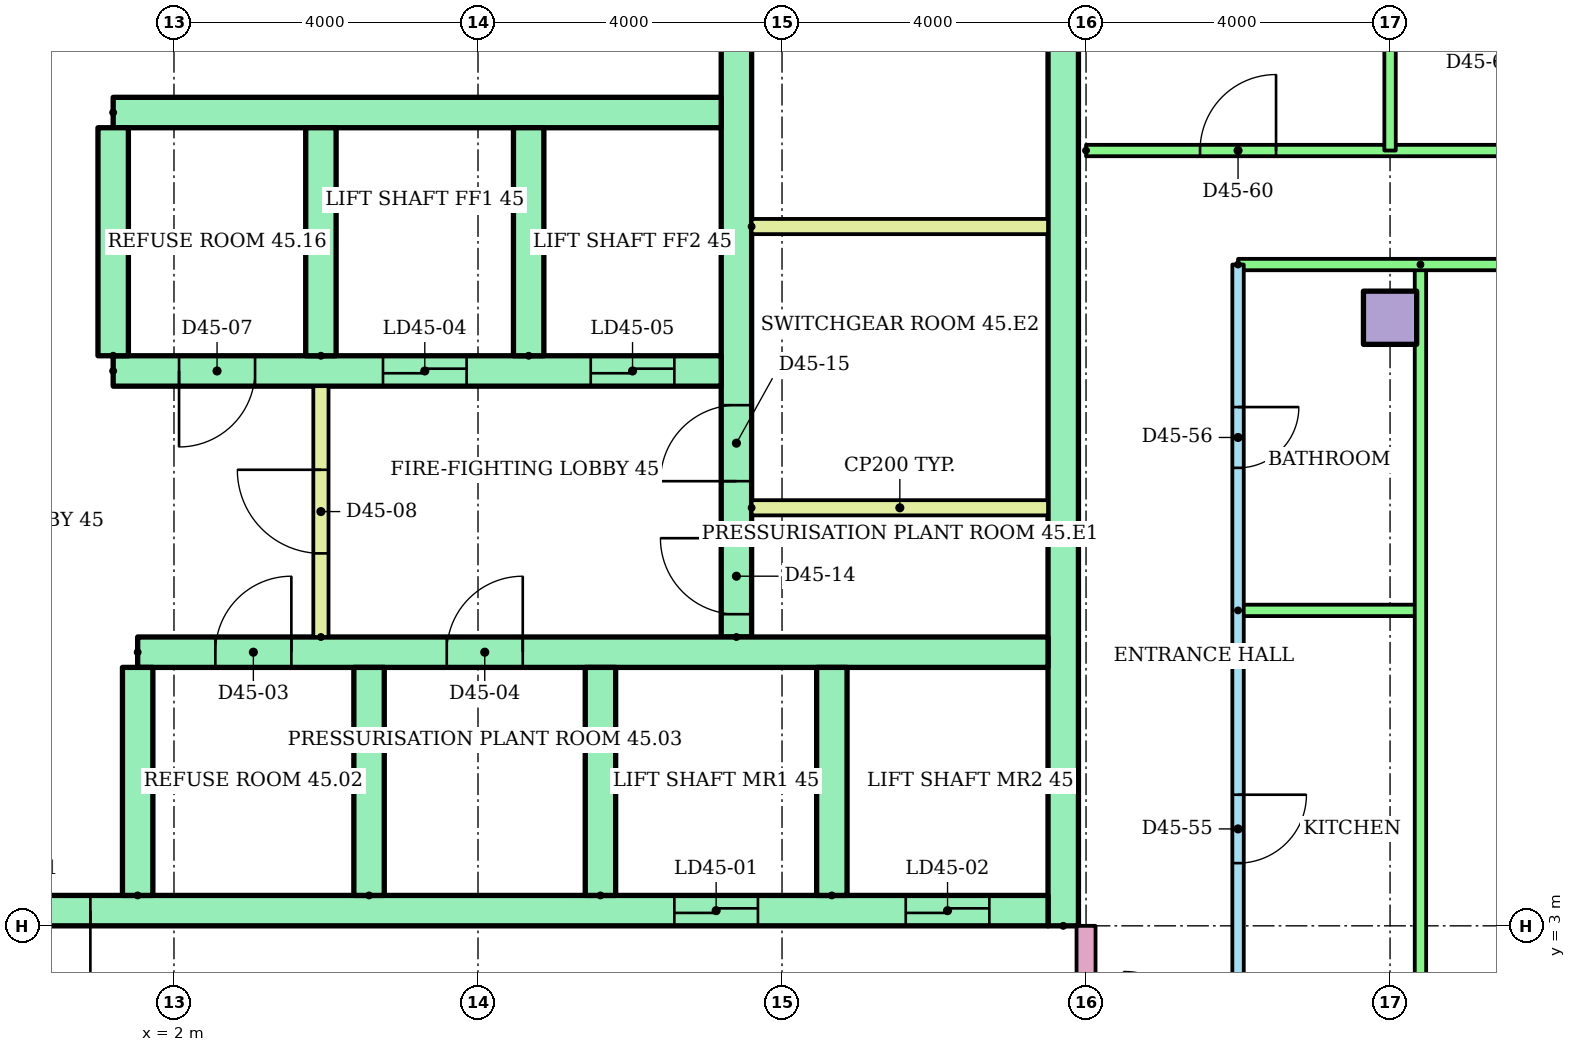
"""IFC4 building model, lengths in metres.
Left out: names, types, materials, properties, quantities, classifications, styles, units other than length and angle.
Written with IfcOpenShell. Run it as: python <this file> out.ifc"""

import sys

from ifc_helpers import new_model, si_unit, direction, frame, frame_2d, origin, origin_2d, place, context, subcontext, project, spatial, rectangle, extrude, element, fill, save


model = new_model("IFC4")
c1 = context("Model", 3, precision=1e-05, world=origin(), true_north=direction((0.0, 1.0)))
c2 = subcontext(c1, "Body", "Model", "MODEL_VIEW")
j1 = project(units=[si_unit("LENGTHUNIT", "METRE"), si_unit("PLANEANGLEUNIT", "RADIAN")], contexts=[c1])
p1 = place(None, origin())
s1 = spatial("IfcSite", under=j1, at=p1, CompositionType="ELEMENT")
p2 = place(p1, origin())
s2 = spatial("IfcBuilding", under=s1, at=p2, CompositionType="ELEMENT")
p3 = place(p2, frame((0.0, 0.0, 174.9)))
s3 = spatial("IfcBuildingStorey", under=s2, at=p3, CompositionType="ELEMENT", Elevation=174.9)
p4 = place(p3, frame((18.0, 11.0, 0.0)))
e1 = element("IfcColumn", 1, at=p4, inside=s3, PredefinedType="COLUMN", context=c2, shape_type="SweptSolid", body=[
    extrude(rectangle(XDim=0.7, YDim=0.7, at=origin_2d()), origin(), (0.0, 0.0, 1.0), 3.2),
])
p5 = place(p3, frame((13.7, 3.0, 0.0), z_axis=(0.0, 0.0, 1.0), x_axis=(0.0, 1.0, 0.0)))
e2 = element("IfcWall", 2, at=p5, inside=s3, PredefinedType="SHEAR", context=c2, shape_type="SweptSolid", body=[
    extrude(rectangle(XDim=17.0, YDim=0.4, at=frame_2d((8.5, 0.0))), origin(), (0.0, 0.0, 1.0), 2.92),
])
p6 = place(p3, frame((9.4, 6.8, 0.0), z_axis=(0.0, 0.0, 1.0), x_axis=(0.0, 1.0, 0.0)))
e3 = element("IfcWall", 3, at=p6, inside=s3, PredefinedType="SHEAR", context=c2, shape_type="SweptSolid", body=[
    extrude(rectangle(XDim=12.7, YDim=0.4, at=frame_2d((6.35, 0.0))), origin(), (0.0, 0.0, 1.0), 2.92),
])
p7 = place(p6, frame((0.3, 0.0, 0.0)))
e4 = element("IfcOpeningElement", 4, at=p7, cuts=e3, PredefinedType="OPENING", context=c2, shape_type="SweptSolid", body=[
    extrude(rectangle(XDim=1.0, YDim=2.1, at=frame_2d((0.5, 1.05))), frame((0.0, 0.21, 0.0), z_axis=(0.0, -1.0, 0.0), x_axis=(1.0, 0.0, 0.0)), (0.0, 0.0, 1.0), 0.42),
])
p8 = place(p6, frame((2.05, 0.0, 0.0)))
e5 = element("IfcOpeningElement", 5, at=p8, cuts=e3, PredefinedType="OPENING", context=c2, shape_type="SweptSolid", body=[
    extrude(rectangle(XDim=1.0, YDim=2.1, at=frame_2d((0.5, 1.05))), frame((0.0, 0.21, 0.0), z_axis=(0.0, -1.0, 0.0), x_axis=(1.0, 0.0, 0.0)), (0.0, 0.0, 1.0), 0.42),
])
p9 = place(p6, frame((7.925, 0.0, 0.0)))
e6 = element("IfcOpeningElement", 6, at=p9, cuts=e3, PredefinedType="OPENING", context=c2, shape_type="SweptSolid", body=[
    extrude(rectangle(XDim=1.0, YDim=2.1, at=frame_2d((0.5, 1.05))), frame((0.0, 0.21, 0.0), z_axis=(0.0, -1.0, 0.0), x_axis=(1.0, 0.0, 0.0)), (0.0, 0.0, 1.0), 0.42),
])
p10 = place(p3, frame((-13.5, 3.2, 0.0)))
e7 = element("IfcWall", 7, at=p10, inside=s3, PredefinedType="SHEAR", context=c2, shape_type="SweptSolid", body=[
    extrude(rectangle(XDim=27.0, YDim=0.4, at=frame_2d((13.5, 0.0))), origin(), (0.0, 0.0, 1.0), 2.92),
])
p11 = place(p10, frame((22.083, 0.0, 0.0)))
e8 = element("IfcOpeningElement", 8, at=p11, cuts=e7, PredefinedType="OPENING", context=c2, shape_type="SweptSolid", body=[
    extrude(rectangle(XDim=1.1, YDim=2.1, at=frame_2d((0.55, 1.05))), frame((0.0, 0.21, 0.0), z_axis=(0.0, -1.0, 0.0), x_axis=(1.0, 0.0, 0.0)), (0.0, 0.0, 1.0), 0.42),
])
p12 = place(p10, frame((25.128, 0.0, 0.0)))
e9 = element("IfcOpeningElement", 9, at=p12, cuts=e7, PredefinedType="OPENING", context=c2, shape_type="SweptSolid", body=[
    extrude(rectangle(XDim=1.1, YDim=2.1, at=frame_2d((0.55, 1.05))), frame((0.0, 0.21, 0.0), z_axis=(0.0, -1.0, 0.0), x_axis=(1.0, 0.0, 0.0)), (0.0, 0.0, 1.0), 0.42),
])
p13 = place(p10, frame((12.6, 0.0, 0.0)))
e10 = element("IfcOpeningElement", 10, at=p13, cuts=e7, PredefinedType="OPENING", context=c2, shape_type="SweptSolid", body=[
    extrude(rectangle(XDim=1.8, YDim=2.1, at=frame_2d((0.9, 1.05))), frame((0.0, 0.21, 0.0), z_axis=(0.0, -1.0, 0.0), x_axis=(1.0, 0.0, 0.0)), (0.0, 0.0, 1.0), 0.42),
])
p14 = place(p3, frame((1.522, 6.6, 0.0)))
e11 = element("IfcWall", 11, at=p14, inside=s3, PredefinedType="SHEAR", context=c2, shape_type="SweptSolid", body=[
    extrude(rectangle(XDim=11.978, YDim=0.4, at=frame_2d((5.989, 0.0))), origin(), (0.0, 0.0, 1.0), 2.92),
])
p15 = place(p14, frame((1.022, 0.0, 0.0)))
e12 = element("IfcOpeningElement", 12, at=p15, cuts=e11, PredefinedType="OPENING", context=c2, shape_type="SweptSolid", body=[
    extrude(rectangle(XDim=1.0, YDim=2.1, at=frame_2d((0.5, 1.05))), frame((0.0, 0.21, 0.0), z_axis=(0.0, -1.0, 0.0), x_axis=(1.0, 0.0, 0.0)), (0.0, 0.0, 1.0), 0.42),
])
p16 = place(p14, frame((4.067, 0.0, 0.0)))
e13 = element("IfcOpeningElement", 13, at=p16, cuts=e11, PredefinedType="OPENING", context=c2, shape_type="SweptSolid", body=[
    extrude(rectangle(XDim=1.0, YDim=2.1, at=frame_2d((0.5, 1.05))), frame((0.0, 0.21, 0.0), z_axis=(0.0, -1.0, 0.0), x_axis=(1.0, 0.0, 0.0)), (0.0, 0.0, 1.0), 0.42),
])
for number, where, z_axis, x_axis in (
    (14, (1.522, 3.4, 0.0), (0.0, 0.0, 1.0), (0.0, 1.0, 0.0)),
    (15, (4.567, 3.4, 0.0), (0.0, 0.0, 1.0), (0.0, 1.0, 0.0)),
    (16, (7.611, 3.4, 0.0), (0.0, 0.0, 1.0), (0.0, 1.0, 0.0)),
    (17, (10.656, 3.4, 0.0), (0.0, 0.0, 1.0), (0.0, 1.0, 0.0)),
):
    element("IfcWall", number, at=place(p3, frame(where, z_axis=z_axis, x_axis=x_axis)), inside=s3, PredefinedType="SHEAR", context=c2, shape_type="SweptSolid", body=[
        extrude(rectangle(XDim=3.0, YDim=0.4, at=frame_2d((1.5, 0.0))), origin(), (0.0, 0.0, 1.0), 2.92),
    ])
p17 = place(p3, frame((1.2, 10.3, 0.0)))
e18 = element("IfcWall", 18, at=p17, inside=s3, PredefinedType="SHEAR", context=c2, shape_type="SweptSolid", body=[
    extrude(rectangle(XDim=8.0, YDim=0.4, at=frame_2d((4.0, 0.0))), origin(), (0.0, 0.0, 1.0), 2.92),
])
p18 = place(p17, frame((3.55, 0.0, 0.0)))
e19 = element("IfcOpeningElement", 19, at=p18, cuts=e18, PredefinedType="OPENING", context=c2, shape_type="SweptSolid", body=[
    extrude(rectangle(XDim=1.1, YDim=2.1, at=frame_2d((0.55, 1.05))), frame((0.0, 0.21, 0.0), z_axis=(0.0, -1.0, 0.0), x_axis=(1.0, 0.0, 0.0)), (0.0, 0.0, 1.0), 0.42),
])
p19 = place(p17, frame((6.283, 0.0, 0.0)))
e20 = element("IfcOpeningElement", 20, at=p19, cuts=e18, PredefinedType="OPENING", context=c2, shape_type="SweptSolid", body=[
    extrude(rectangle(XDim=1.1, YDim=2.1, at=frame_2d((0.55, 1.05))), frame((0.0, 0.21, 0.0), z_axis=(0.0, -1.0, 0.0), x_axis=(1.0, 0.0, 0.0)), (0.0, 0.0, 1.0), 0.42),
])
p20 = place(p17, frame((0.867, 0.0, 0.0)))
e21 = element("IfcOpeningElement", 21, at=p20, cuts=e18, PredefinedType="OPENING", context=c2, shape_type="SweptSolid", body=[
    extrude(rectangle(XDim=1.0, YDim=2.1, at=frame_2d((0.5, 1.05))), frame((0.0, 0.21, 0.0), z_axis=(0.0, -1.0, 0.0), x_axis=(1.0, 0.0, 0.0)), (0.0, 0.0, 1.0), 0.42),
])
p21 = place(p3, frame((1.2, 13.7, 0.0)))
e22 = element("IfcWall", 22, at=p21, inside=s3, PredefinedType="SHEAR", context=c2, shape_type="SweptSolid", body=[
    extrude(rectangle(XDim=8.0, YDim=0.4, at=frame_2d((4.0, 0.0))), origin(), (0.0, 0.0, 1.0), 2.92),
])
for number, where, z_axis, x_axis in (
    (23, (1.2, 10.5, 0.0), (0.0, 0.0, 1.0), (0.0, 1.0, 0.0)),
    (24, (3.933, 10.5, 0.0), (0.0, 0.0, 1.0), (0.0, 1.0, 0.0)),
    (25, (6.667, 10.5, 0.0), (0.0, 0.0, 1.0), (0.0, 1.0, 0.0)),
):
    element("IfcWall", number, at=place(p3, frame(where, z_axis=z_axis, x_axis=x_axis)), inside=s3, PredefinedType="SHEAR", context=c2, shape_type="SweptSolid", body=[
        extrude(rectangle(XDim=3.0, YDim=0.4, at=frame_2d((1.5, 0.0))), origin(), (0.0, 0.0, 1.0), 2.92),
    ])
p22 = place(p3, frame((3.933, 6.8, 0.0), z_axis=(0.0, 0.0, 1.0), x_axis=(0.0, 1.0, 0.0)))
e26 = element("IfcWall", 26, at=p22, inside=s3, PredefinedType="PARTITIONING", context=c2, shape_type="SweptSolid", body=[
    extrude(rectangle(XDim=3.3, YDim=0.2, at=frame_2d((1.65, 0.0))), origin(), (0.0, 0.0, 1.0), 2.92),
])
p23 = place(p22, frame((1.1, 0.0, 0.0)))
e27 = element("IfcOpeningElement", 27, at=p23, cuts=e26, PredefinedType="OPENING", context=c2, shape_type="SweptSolid", body=[
    extrude(rectangle(XDim=1.1, YDim=2.1, at=frame_2d((0.55, 1.05))), frame((0.0, 0.11, 0.0), z_axis=(0.0, -1.0, 0.0), x_axis=(1.0, 0.0, 0.0)), (0.0, 0.0, 1.0), 0.22),
])
for number, where in (
    (28, (9.6, 8.5, 0.0)),
    (29, (9.6, 12.2, 0.0)),
):
    element("IfcWall", number, at=place(p3, frame(where)), inside=s3, PredefinedType="PARTITIONING", context=c2, shape_type="SweptSolid", body=[
        extrude(rectangle(XDim=3.9, YDim=0.2, at=frame_2d((1.95, 0.0))), origin(), (0.0, 0.0, 1.0), 2.92),
    ])
p24 = place(p3, frame((16.0, 11.7, 0.0), z_axis=(0.0, 0.0, 1.0), x_axis=(0.0, -1.0, 0.0)))
e30 = element("IfcWall", 30, at=p24, inside=s3, PredefinedType="PARTITIONING", context=c2, shape_type="SweptSolid", body=[
    extrude(rectangle(XDim=10.3, YDim=0.15, at=frame_2d((5.15, 0.0))), origin(), (0.0, 0.0, 1.0), 2.4),
])
p25 = place(p24, frame((6.975, 0.0, 0.0)))
e31 = element("IfcOpeningElement", 31, at=p25, cuts=e30, PredefinedType="OPENING", context=c2, shape_type="SweptSolid", body=[
    extrude(rectangle(XDim=0.9, YDim=2.1, at=frame_2d((0.45, 1.05))), frame((0.0, 0.085, 0.0), z_axis=(0.0, -1.0, 0.0), x_axis=(1.0, 0.0, 0.0)), (0.0, 0.0, 1.0), 0.17),
])
p26 = place(p24, frame((1.875, 0.0, 0.0)))
e32 = element("IfcOpeningElement", 32, at=p26, cuts=e30, PredefinedType="OPENING", context=c2, shape_type="SweptSolid", body=[
    extrude(rectangle(XDim=0.8, YDim=2.1, at=frame_2d((0.4, 1.05))), frame((0.0, 0.085, 0.0), z_axis=(0.0, -1.0, 0.0), x_axis=(1.0, 0.0, 0.0)), (0.0, 0.0, 1.0), 0.17),
])
p27 = place(p3, frame((16.0, 7.15, 0.0)))
e33 = element("IfcWall", 33, at=p27, inside=s3, PredefinedType="PARTITIONING", context=c2, shape_type="SweptSolid", body=[
    extrude(rectangle(XDim=2.4, YDim=0.15, at=frame_2d((1.2, 0.0))), origin(), (0.0, 0.0, 1.0), 2.4),
])
p28 = place(p3, frame((18.4, 11.7, 0.0), z_axis=(0.0, 0.0, 1.0), x_axis=(0.0, -1.0, 0.0)))
e34 = element("IfcWall", 34, at=p28, inside=s3, PredefinedType="PARTITIONING", context=c2, shape_type="SweptSolid", body=[
    extrude(rectangle(XDim=10.3, YDim=0.15, at=frame_2d((5.15, 0.0))), origin(), (0.0, 0.0, 1.0), 2.4),
])
p29 = place(p3, frame((36.82, 11.7, 0.0), z_axis=(0.0, 0.0, 1.0), x_axis=(-1.0, 0.0, 0.0)))
e35 = element("IfcWall", 35, at=p29, inside=s3, PredefinedType="PARTITIONING", context=c2, shape_type="SweptSolid", body=[
    extrude(rectangle(XDim=20.82, YDim=0.15, at=frame_2d((10.41, 0.0))), origin(), (0.0, 0.0, 1.0), 2.4),
])
p30 = place(p29, frame((14.095, 0.0, 0.0)))
e36 = element("IfcOpeningElement", 36, at=p30, cuts=e35, PredefinedType="OPENING", context=c2, shape_type="SweptSolid", body=[
    extrude(rectangle(XDim=0.9, YDim=2.1, at=frame_2d((0.45, 1.05))), frame((0.0, 0.085, 0.0), z_axis=(0.0, -1.0, 0.0), x_axis=(1.0, 0.0, 0.0)), (0.0, 0.0, 1.0), 0.17),
])
p31 = place(p29, frame((7.22, 0.0, 0.0)))
e37 = element("IfcOpeningElement", 37, at=p31, cuts=e35, PredefinedType="OPENING", context=c2, shape_type="SweptSolid", body=[
    extrude(rectangle(XDim=0.9, YDim=2.1, at=frame_2d((0.45, 1.05))), frame((0.0, 0.085, 0.0), z_axis=(0.0, -1.0, 0.0), x_axis=(1.0, 0.0, 0.0)), (0.0, 0.0, 1.0), 0.17),
])
p32 = place(p29, frame((1.373, 0.0, 0.0)))
e38 = element("IfcOpeningElement", 38, at=p32, cuts=e35, PredefinedType="OPENING", context=c2, shape_type="SweptSolid", body=[
    extrude(rectangle(XDim=0.9, YDim=2.1, at=frame_2d((0.45, 1.05))), frame((0.0, 0.085, 0.0), z_axis=(0.0, -1.0, 0.0), x_axis=(1.0, 0.0, 0.0)), (0.0, 0.0, 1.0), 0.17),
])
p33 = place(p3, frame((14.0, 13.2, 0.0)))
e39 = element("IfcWall", 39, at=p33, inside=s3, PredefinedType="PARTITIONING", context=c2, shape_type="SweptSolid", body=[
    extrude(rectangle(XDim=22.82, YDim=0.15, at=frame_2d((11.41, 0.0))), origin(), (0.0, 0.0, 1.0), 2.4),
])
p34 = place(p33, frame((1.5, 0.0, 0.0)))
e40 = element("IfcOpeningElement", 40, at=p34, cuts=e39, PredefinedType="OPENING", context=c2, shape_type="SweptSolid", body=[
    extrude(rectangle(XDim=1.0, YDim=2.1, at=frame_2d((0.5, 1.05))), frame((0.0, 0.085, 0.0), z_axis=(0.0, -1.0, 0.0), x_axis=(1.0, 0.0, 0.0)), (0.0, 0.0, 1.0), 0.17),
])
p35 = place(p33, frame((7.55, 0.0, 0.0)))
e41 = element("IfcOpeningElement", 41, at=p35, cuts=e39, PredefinedType="OPENING", context=c2, shape_type="SweptSolid", body=[
    extrude(rectangle(XDim=0.9, YDim=2.1, at=frame_2d((0.45, 1.05))), frame((0.0, 0.085, 0.0), z_axis=(0.0, -1.0, 0.0), x_axis=(1.0, 0.0, 0.0)), (0.0, 0.0, 1.0), 0.17),
])
p36 = place(p33, frame((14.6, 0.0, 0.0)))
e42 = element("IfcOpeningElement", 42, at=p36, cuts=e39, PredefinedType="OPENING", context=c2, shape_type="SweptSolid", body=[
    extrude(rectangle(XDim=0.9, YDim=2.1, at=frame_2d((0.45, 1.05))), frame((0.0, 0.085, 0.0), z_axis=(0.0, -1.0, 0.0), x_axis=(1.0, 0.0, 0.0)), (0.0, 0.0, 1.0), 0.17),
])
p37 = place(p33, frame((19.9, 0.0, 0.0)))
e43 = element("IfcOpeningElement", 43, at=p37, cuts=e39, PredefinedType="OPENING", context=c2, shape_type="SweptSolid", body=[
    extrude(rectangle(XDim=0.9, YDim=2.1, at=frame_2d((0.45, 1.05))), frame((0.0, 0.085, 0.0), z_axis=(0.0, -1.0, 0.0), x_axis=(1.0, 0.0, 0.0)), (0.0, 0.0, 1.0), 0.17),
])
p38 = place(p3, frame((18.0, 18.821, 0.0), z_axis=(0.0, 0.0, 1.0), x_axis=(0.0, -1.0, 0.0)))
e44 = element("IfcWall", 44, at=p38, inside=s3, PredefinedType="PARTITIONING", context=c2, shape_type="SweptSolid", body=[
    extrude(rectangle(XDim=5.621, YDim=0.15, at=frame_2d((2.811, 0.0))), origin(), (0.0, 0.0, 1.0), 2.4),
])
p39 = place(p3, frame((14.0, 1.4, 0.0), z_axis=(0.0, 0.0, 1.0), x_axis=(0.0, 1.0, 0.0)))
e45 = element("IfcWall", 45, at=p39, inside=s3, PredefinedType="PARTITIONING", context=c2, shape_type="SweptSolid", body=[
    extrude(rectangle(XDim=1.6, YDim=0.25, at=frame_2d((0.8, 0.0))), origin(), (0.0, 0.0, 1.0), 2.4),
])
p40 = place(p11, origin())
e46 = element("IfcDoor", 46, at=p40, inside=s3, OperationType="SLIDING_TO_LEFT", PredefinedType="DOOR", context=c2, shape_type="SweptSolid", body=[
    extrude(rectangle(XDim=1.1, YDim=2.1, at=frame_2d((0.55, 1.05))), frame((0.0, 0.025, 0.0), z_axis=(0.0, -1.0, 0.0), x_axis=(1.0, 0.0, 0.0)), (0.0, 0.0, 1.0), 0.05),
])
fill(e8, e46)
p41 = place(p12, origin())
e47 = element("IfcDoor", 47, at=p41, inside=s3, OperationType="SLIDING_TO_LEFT", PredefinedType="DOOR", context=c2, shape_type="SweptSolid", body=[
    extrude(rectangle(XDim=1.1, YDim=2.1, at=frame_2d((0.55, 1.05))), frame((0.0, 0.025, 0.0), z_axis=(0.0, -1.0, 0.0), x_axis=(1.0, 0.0, 0.0)), (0.0, 0.0, 1.0), 0.05),
])
fill(e9, e47)
p42 = place(p13, frame((1.8, 0.0, 0.0), z_axis=(0.0, 0.0, 1.0), x_axis=(-1.0, 0.0, 0.0)))
e48 = element("IfcDoor", 48, at=p42, inside=s3, OperationType="DOUBLE_DOOR_SINGLE_SWING", PredefinedType="DOOR", context=c2, shape_type="SweptSolid", body=[
    extrude(rectangle(XDim=1.8, YDim=2.1, at=frame_2d((0.9, 1.05))), frame((0.0, 0.025, 0.0), z_axis=(0.0, -1.0, 0.0), x_axis=(1.0, 0.0, 0.0)), (0.0, 0.0, 1.0), 0.05),
])
fill(e10, e48)
p43 = place(p15, origin())
e49 = element("IfcDoor", 49, at=p43, inside=s3, OperationType="SINGLE_SWING_RIGHT", PredefinedType="DOOR", context=c2, shape_type="SweptSolid", body=[
    extrude(rectangle(XDim=1.0, YDim=2.1, at=frame_2d((0.5, 1.05))), frame((0.0, 0.025, 0.0), z_axis=(0.0, -1.0, 0.0), x_axis=(1.0, 0.0, 0.0)), (0.0, 0.0, 1.0), 0.05),
])
fill(e12, e49)
p44 = place(p16, origin())
e50 = element("IfcDoor", 50, at=p44, inside=s3, OperationType="SINGLE_SWING_RIGHT", PredefinedType="DOOR", context=c2, shape_type="SweptSolid", body=[
    extrude(rectangle(XDim=1.0, YDim=2.1, at=frame_2d((0.5, 1.05))), frame((0.0, 0.025, 0.0), z_axis=(0.0, -1.0, 0.0), x_axis=(1.0, 0.0, 0.0)), (0.0, 0.0, 1.0), 0.05),
])
fill(e13, e50)
p45 = place(p18, origin())
e51 = element("IfcDoor", 51, at=p45, inside=s3, OperationType="SLIDING_TO_LEFT", PredefinedType="DOOR", context=c2, shape_type="SweptSolid", body=[
    extrude(rectangle(XDim=1.1, YDim=2.1, at=frame_2d((0.55, 1.05))), frame((0.0, 0.025, 0.0), z_axis=(0.0, -1.0, 0.0), x_axis=(1.0, 0.0, 0.0)), (0.0, 0.0, 1.0), 0.05),
])
fill(e19, e51)
p46 = place(p19, origin())
e52 = element("IfcDoor", 52, at=p46, inside=s3, OperationType="SLIDING_TO_LEFT", PredefinedType="DOOR", context=c2, shape_type="SweptSolid", body=[
    extrude(rectangle(XDim=1.1, YDim=2.1, at=frame_2d((0.55, 1.05))), frame((0.0, 0.025, 0.0), z_axis=(0.0, -1.0, 0.0), x_axis=(1.0, 0.0, 0.0)), (0.0, 0.0, 1.0), 0.05),
])
fill(e20, e52)
p47 = place(p20, frame((1.0, 0.0, 0.0), z_axis=(0.0, 0.0, 1.0), x_axis=(-1.0, 0.0, 0.0)))
e53 = element("IfcDoor", 53, at=p47, inside=s3, OperationType="SINGLE_SWING_LEFT", PredefinedType="DOOR", context=c2, shape_type="SweptSolid", body=[
    extrude(rectangle(XDim=1.0, YDim=2.1, at=frame_2d((0.5, 1.05))), frame((0.0, 0.025, 0.0), z_axis=(0.0, -1.0, 0.0), x_axis=(1.0, 0.0, 0.0)), (0.0, 0.0, 1.0), 0.05),
])
fill(e21, e53)
p48 = place(p23, origin())
e54 = element("IfcDoor", 54, at=p48, inside=s3, OperationType="SINGLE_SWING_RIGHT", PredefinedType="DOOR", context=c2, shape_type="SweptSolid", body=[
    extrude(rectangle(XDim=1.1, YDim=2.1, at=frame_2d((0.55, 1.05))), frame((0.0, 0.025, 0.0), z_axis=(0.0, -1.0, 0.0), x_axis=(1.0, 0.0, 0.0)), (0.0, 0.0, 1.0), 0.05),
])
fill(e27, e54)
p49 = place(p7, origin())
e55 = element("IfcDoor", 55, at=p49, inside=s3, OperationType="SINGLE_SWING_RIGHT", PredefinedType="DOOR", context=c2, shape_type="SweptSolid", body=[
    extrude(rectangle(XDim=1.0, YDim=2.1, at=frame_2d((0.5, 1.05))), frame((0.0, 0.025, 0.0), z_axis=(0.0, -1.0, 0.0), x_axis=(1.0, 0.0, 0.0)), (0.0, 0.0, 1.0), 0.05),
])
fill(e4, e55)
p50 = place(p8, origin())
e56 = element("IfcDoor", 56, at=p50, inside=s3, OperationType="SINGLE_SWING_LEFT", PredefinedType="DOOR", context=c2, shape_type="SweptSolid", body=[
    extrude(rectangle(XDim=1.0, YDim=2.1, at=frame_2d((0.5, 1.05))), frame((0.0, 0.025, 0.0), z_axis=(0.0, -1.0, 0.0), x_axis=(1.0, 0.0, 0.0)), (0.0, 0.0, 1.0), 0.05),
])
fill(e5, e56)
p51 = place(p25, origin())
e57 = element("IfcDoor", 57, at=p51, inside=s3, OperationType="SINGLE_SWING_LEFT", PredefinedType="DOOR", context=c2, shape_type="SweptSolid", body=[
    extrude(rectangle(XDim=0.9, YDim=2.1, at=frame_2d((0.45, 1.05))), frame((0.0, 0.025, 0.0), z_axis=(0.0, -1.0, 0.0), x_axis=(1.0, 0.0, 0.0)), (0.0, 0.0, 1.0), 0.05),
])
fill(e31, e57)
p52 = place(p26, origin())
e58 = element("IfcDoor", 58, at=p52, inside=s3, OperationType="SINGLE_SWING_LEFT", PredefinedType="DOOR", context=c2, shape_type="SweptSolid", body=[
    extrude(rectangle(XDim=0.8, YDim=2.1, at=frame_2d((0.4, 1.05))), frame((0.0, 0.025, 0.0), z_axis=(0.0, -1.0, 0.0), x_axis=(1.0, 0.0, 0.0)), (0.0, 0.0, 1.0), 0.05),
])
fill(e32, e58)
p53 = place(p34, origin())
e59 = element("IfcDoor", 59, at=p53, inside=s3, OperationType="SINGLE_SWING_RIGHT", PredefinedType="DOOR", context=c2, shape_type="SweptSolid", body=[
    extrude(rectangle(XDim=1.0, YDim=2.1, at=frame_2d((0.5, 1.05))), frame((0.0, 0.025, 0.0), z_axis=(0.0, -1.0, 0.0), x_axis=(1.0, 0.0, 0.0)), (0.0, 0.0, 1.0), 0.05),
])
fill(e40, e59)
save(model, sys.argv[1])
